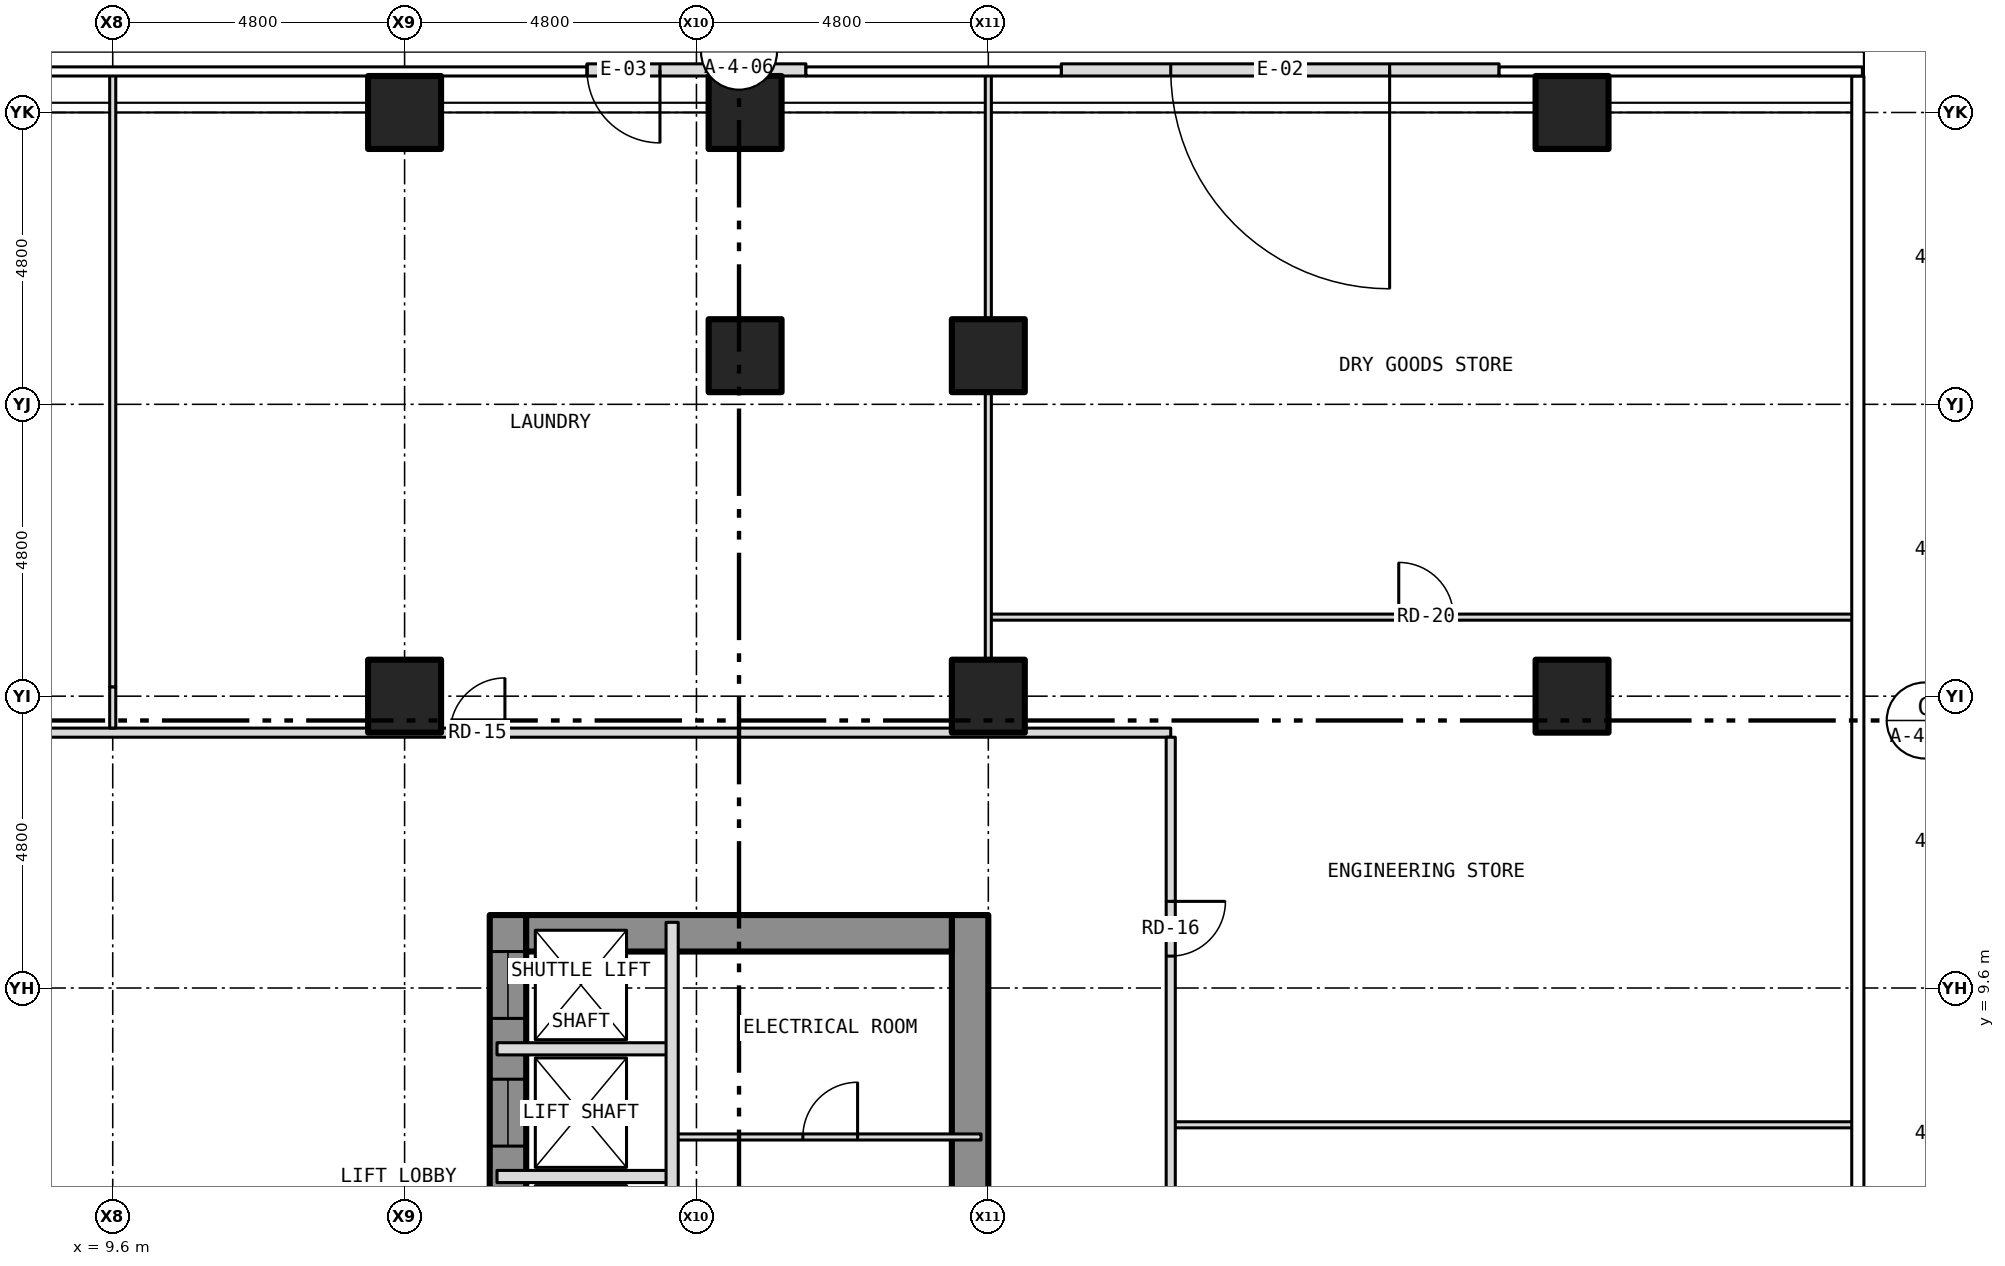
"""IFC4 building model, lengths in metres.
Left out: names, types, materials, properties, quantities, classifications, styles, units other than length and angle.
Written with IfcOpenShell. Run it as: python <this file> out.ifc"""

import sys

from ifc_helpers import new_model, si_unit, direction, frame, frame_2d, origin, origin_2d, place, context, subcontext, project, spatial, rectangle, hollow_rectangle, extrude, element, fill, save


model = new_model("IFC4")
c1 = context("Model", 3, precision=1e-05, world=origin(), true_north=direction((0.0, 1.0)))
c2 = subcontext(c1, "Body", "Model", "MODEL_VIEW")
j1 = project(units=[si_unit("LENGTHUNIT", "METRE"), si_unit("PLANEANGLEUNIT", "RADIAN")], contexts=[c1])
p1 = place(None, origin())
s1 = spatial("IfcSite", under=j1, at=p1, CompositionType="ELEMENT")
p2 = place(p1, origin())
s2 = spatial("IfcBuilding", under=s1, at=p2, CompositionType="ELEMENT")
p3 = place(p2, origin())
s3 = spatial("IfcBuildingStorey", under=s2, at=p3, CompositionType="ELEMENT", Elevation=0.0)
for number, where, z_axis, x_axis in (
    (1, (14.4, 24.0, -0.3), (0.0, 0.0, 1.0), (1.0, 0.0, 0.0)),
    (2, (20.0, 24.0, -0.3), (0.0, 0.0, 1.0), (1.0, 0.0, 0.0)),
    (3, (33.6, 14.4, -0.3), (0.0, 0.0, 1.0), (1.0, 0.0, 0.0)),
    (4, (33.6, 24.0, -0.3), (0.0, 0.0, 1.0), (1.0, 0.0, 0.0)),
    (5, (14.4, 14.4, -0.3), (0.0, 0.0, 1.0), (1.0, 0.0, 0.0)),
    (6, (20.0, 20.0, -0.3), (0.0, 0.0, 1.0), (1.0, 0.0, 0.0)),
    (7, (24.0, 14.4, -0.3), (0.0, 0.0, 1.0), (1.0, 0.0, 0.0)),
    (8, (24.0, 20.0, -0.3), (0.0, 0.0, 1.0), (1.0, 0.0, 0.0)),
):
    element("IfcColumn", number, at=place(p3, frame(where, z_axis=z_axis, x_axis=x_axis)), inside=s3, PredefinedType="COLUMN", context=c2, shape_type="SweptSolid", body=[
        extrude(hollow_rectangle(XDim=1.2, YDim=1.2, WallThickness=0.07, at=origin_2d()), origin(), (0.0, 0.0, 1.0), 7.55),
    ])
p4 = place(p3, frame((16.1, -10.8, 0.0), z_axis=(0.0, 0.0, 1.0), x_axis=(0.0, 1.0, 0.0)))
e9 = element("IfcWall", 9, at=p4, inside=s3, PredefinedType="SHEAR", context=c2, shape_type="SweptSolid", body=[
    extrude(rectangle(XDim=21.6, YDim=0.6, at=frame_2d((10.8, 0.0))), origin(), (0.0, 0.0, 1.0), 7.2),
])
p5 = place(p4, frame((9.4, 0.0, 0.0)))
e10 = element("IfcOpeningElement", 10, at=p5, cuts=e9, PredefinedType="OPENING", context=c2, shape_type="SweptSolid", body=[
    extrude(rectangle(XDim=1.1, YDim=2.1, at=frame_2d((0.55, 1.05))), frame((0.0, 0.312, 0.0), z_axis=(0.0, -1.0, 0.0), x_axis=(1.0, 0.0, 0.0)), (0.0, 0.0, 1.0), 0.624),
])
p6 = place(p4, frame((11.5, 0.0, 0.0)))
e11 = element("IfcOpeningElement", 11, at=p6, cuts=e9, PredefinedType="OPENING", context=c2, shape_type="SweptSolid", body=[
    extrude(rectangle(XDim=1.1, YDim=2.1, at=frame_2d((0.55, 1.05))), frame((0.0, 0.312, 0.0), z_axis=(0.0, -1.0, 0.0), x_axis=(1.0, 0.0, 0.0)), (0.0, 0.0, 1.0), 0.624),
])
p7 = place(p4, frame((13.6, 0.0, 0.0)))
e12 = element("IfcOpeningElement", 12, at=p7, cuts=e9, PredefinedType="OPENING", context=c2, shape_type="SweptSolid", body=[
    extrude(rectangle(XDim=1.1, YDim=2.1, at=frame_2d((0.55, 1.05))), frame((0.0, 0.312, 0.0), z_axis=(0.0, -1.0, 0.0), x_axis=(1.0, 0.0, 0.0)), (0.0, 0.0, 1.0), 0.624),
])
p8 = place(p4, frame((15.7, 0.0, 0.0)))
e13 = element("IfcOpeningElement", 13, at=p8, cuts=e9, PredefinedType="OPENING", context=c2, shape_type="SweptSolid", body=[
    extrude(rectangle(XDim=1.1, YDim=2.1, at=frame_2d((0.55, 1.05))), frame((0.0, 0.312, 0.0), z_axis=(0.0, -1.0, 0.0), x_axis=(1.0, 0.0, 0.0)), (0.0, 0.0, 1.0), 0.624),
])
p9 = place(p4, frame((17.8, 0.0, 0.0)))
e14 = element("IfcOpeningElement", 14, at=p9, cuts=e9, PredefinedType="OPENING", context=c2, shape_type="SweptSolid", body=[
    extrude(rectangle(XDim=1.1, YDim=2.1, at=frame_2d((0.55, 1.05))), frame((0.0, 0.312, 0.0), z_axis=(0.0, -1.0, 0.0), x_axis=(1.0, 0.0, 0.0)), (0.0, 0.0, 1.0), 0.624),
])
p10 = place(p4, frame((19.9, 0.0, 0.0)))
e15 = element("IfcOpeningElement", 15, at=p10, cuts=e9, PredefinedType="OPENING", context=c2, shape_type="SweptSolid", body=[
    extrude(rectangle(XDim=1.1, YDim=2.1, at=frame_2d((0.55, 1.05))), frame((0.0, 0.312, 0.0), z_axis=(0.0, -1.0, 0.0), x_axis=(1.0, 0.0, 0.0)), (0.0, 0.0, 1.0), 0.624),
])
p11 = place(p3, frame((23.7, -10.8, 0.0), z_axis=(0.0, 0.0, 1.0), x_axis=(0.0, 1.0, 0.0)))
e16 = element("IfcWall", 16, at=p11, inside=s3, PredefinedType="SHEAR", context=c2, shape_type="SweptSolid", body=[
    extrude(rectangle(XDim=21.6, YDim=0.6, at=frame_2d((10.8, 0.0))), origin(), (0.0, 0.0, 1.0), 7.2),
])
p12 = place(p3, frame((16.4, 10.5, 0.0), z_axis=(0.0, 0.0, 1.0), x_axis=(1.0, 0.0, 0.0)))
e17 = element("IfcWall", 17, at=p12, inside=s3, PredefinedType="SHEAR", context=c2, shape_type="SweptSolid", body=[
    extrude(rectangle(XDim=7.0, YDim=0.6, at=frame_2d((3.5, 0.0))), origin(), (0.0, 0.0, 1.0), 7.2),
])
p13 = place(p3, frame((32.4, 24.7, -0.2), z_axis=(0.0, 0.0, 1.0), x_axis=(-1.0, 0.0, 0.0)))
e18 = element("IfcWall", 18, at=p13, inside=s3, PredefinedType="SOLIDWALL", context=c2, shape_type="SweptSolid", body=[
    extrude(rectangle(XDim=7.2, YDim=0.2, at=frame_2d((3.6, 0.0))), origin(), (0.0, 0.0, 1.0), 7.7),
])
p14 = place(p13, frame((1.8, 0.0, 0.2)))
e19 = element("IfcOpeningElement", 19, at=p14, cuts=e18, PredefinedType="OPENING", context=c2, shape_type="SweptSolid", body=[
    extrude(rectangle(XDim=3.6, YDim=4.2, at=frame_2d((1.8, 2.1))), frame((0.0, 0.112, 0.0), z_axis=(0.0, -1.0, 0.0), x_axis=(1.0, 0.0, 0.0)), (0.0, 0.0, 1.0), 0.224),
])
p15 = place(p3, frame((21.0, 24.7, -0.2), z_axis=(0.0, 0.0, 1.0), x_axis=(-1.0, 0.0, 0.0)))
e20 = element("IfcWall", 20, at=p15, inside=s3, PredefinedType="SOLIDWALL", context=c2, shape_type="SweptSolid", body=[
    extrude(rectangle(XDim=3.6, YDim=0.2, at=frame_2d((1.8, 0.0))), origin(), (0.0, 0.0, 1.0), 7.7),
])
p16 = place(p15, frame((2.4, 0.0, 0.2)))
e21 = element("IfcOpeningElement", 21, at=p16, cuts=e20, PredefinedType="OPENING", context=c2, shape_type="SweptSolid", body=[
    extrude(rectangle(XDim=1.2, YDim=2.4, at=frame_2d((0.6, 1.2))), frame((0.0, 0.112, 0.0), z_axis=(0.0, -1.0, 0.0), x_axis=(1.0, 0.0, 0.0)), (0.0, 0.0, 1.0), 0.224),
])
p17 = place(p3, frame((15.92, 6.5, 0.0), z_axis=(0.0, 0.0, 1.0), x_axis=(1.0, 0.0, 0.0)))
e22 = element("IfcWall", 22, at=p17, inside=s3, PredefinedType="PARTITIONING", context=c2, shape_type="SweptSolid", body=[
    extrude(rectangle(XDim=2.88, YDim=0.2, at=frame_2d((1.44, 0.0))), origin(), (0.0, 0.0, 1.0), 7.2),
])
p18 = place(p3, frame((18.8, 7.15, 0.0), z_axis=(0.0, 0.0, 1.0), x_axis=(1.0, 0.0, 0.0)))
e23 = element("IfcWall", 23, at=p18, inside=s3, PredefinedType="PARTITIONING", context=c2, shape_type="SweptSolid", body=[
    extrude(rectangle(XDim=5.08, YDim=0.1, at=frame_2d((2.54, 0.0))), origin(), (0.0, 0.0, 1.0), 7.2),
])
p19 = place(p18, frame((2.15, 0.0, 0.0)))
e24 = element("IfcOpeningElement", 24, at=p19, cuts=e23, PredefinedType="OPENING", context=c2, shape_type="SweptSolid", body=[
    extrude(rectangle(XDim=0.9, YDim=2.1, at=frame_2d((0.45, 1.05))), frame((0.0, 0.062, 0.0), z_axis=(0.0, -1.0, 0.0), x_axis=(1.0, 0.0, 0.0)), (0.0, 0.0, 1.0), 0.124),
])
p20 = place(p3, frame((27.0, 7.35, 0.0), z_axis=(0.0, 0.0, 1.0), x_axis=(1.0, 0.0, 0.0)))
e25 = element("IfcWall", 25, at=p20, inside=s3, PredefinedType="PARTITIONING", context=c2, shape_type="SweptSolid", body=[
    extrude(rectangle(XDim=11.28, YDim=0.1, at=frame_2d((5.64, 0.0))), origin(), (0.0, 0.0, 1.0), 7.25),
])
p21 = place(p3, frame((15.92, 8.6, 0.0), z_axis=(0.0, 0.0, 1.0), x_axis=(1.0, 0.0, 0.0)))
e26 = element("IfcWall", 26, at=p21, inside=s3, PredefinedType="PARTITIONING", context=c2, shape_type="SweptSolid", body=[
    extrude(rectangle(XDim=2.88, YDim=0.2, at=frame_2d((1.44, 0.0))), origin(), (0.0, 0.0, 1.0), 7.2),
])
p22 = place(p3, frame((-27.0, 13.8, 0.0), z_axis=(0.0, 0.0, 1.0), x_axis=(1.0, 0.0, 0.0)))
e27 = element("IfcWall", 27, at=p22, inside=s3, PredefinedType="PARTITIONING", context=c2, shape_type="SweptSolid", body=[
    extrude(rectangle(XDim=54.0, YDim=0.15, at=frame_2d((27.0, 0.0))), origin(), (0.0, 0.0, 1.0), 7.25),
])
p23 = place(p22, frame((10.291, 0.0, 0.0)))
e28 = element("IfcOpeningElement", 28, at=p23, cuts=e27, PredefinedType="OPENING", context=c2, shape_type="SweptSolid", body=[
    extrude(rectangle(XDim=0.9, YDim=2.1, at=frame_2d((0.45, 1.05))), frame((0.0, 0.087, 0.0), z_axis=(0.0, -1.0, 0.0), x_axis=(1.0, 0.0, 0.0)), (0.0, 0.0, 1.0), 0.174),
])
p24 = place(p22, frame((20.674, 0.0, 0.0)))
e29 = element("IfcOpeningElement", 29, at=p24, cuts=e27, PredefinedType="OPENING", context=c2, shape_type="SweptSolid", body=[
    extrude(rectangle(XDim=0.9, YDim=2.1, at=frame_2d((0.45, 1.05))), frame((0.0, 0.087, 0.0), z_axis=(0.0, -1.0, 0.0), x_axis=(1.0, 0.0, 0.0)), (0.0, 0.0, 1.0), 0.174),
])
p25 = place(p22, frame((32.55, 0.0, 0.0)))
e30 = element("IfcOpeningElement", 30, at=p25, cuts=e27, PredefinedType="OPENING", context=c2, shape_type="SweptSolid", body=[
    extrude(rectangle(XDim=0.9, YDim=2.1, at=frame_2d((0.45, 1.05))), frame((0.0, 0.087, 0.0), z_axis=(0.0, -1.0, 0.0), x_axis=(1.0, 0.0, 0.0)), (0.0, 0.0, 1.0), 0.174),
])
p26 = place(p22, frame((42.15, 0.0, 0.0)))
e31 = element("IfcOpeningElement", 31, at=p26, cuts=e27, PredefinedType="OPENING", context=c2, shape_type="SweptSolid", body=[
    extrude(rectangle(XDim=0.9, YDim=2.1, at=frame_2d((0.45, 1.05))), frame((0.0, 0.087, 0.0), z_axis=(0.0, -1.0, 0.0), x_axis=(1.0, 0.0, 0.0)), (0.0, 0.0, 1.0), 0.174),
])
p27 = place(p22, frame((3.75, 0.0, 0.0)))
e32 = element("IfcOpeningElement", 32, at=p27, cuts=e27, PredefinedType="OPENING", context=c2, shape_type="SweptSolid", body=[
    extrude(rectangle(XDim=0.9, YDim=2.1, at=frame_2d((0.45, 1.05))), frame((0.0, 0.087, 0.0), z_axis=(0.0, -1.0, 0.0), x_axis=(1.0, 0.0, 0.0)), (0.0, 0.0, 1.0), 0.174),
])
p28 = place(p3, frame((24.0, 15.7, 0.0), z_axis=(0.0, 0.0, 1.0), x_axis=(1.0, 0.0, 0.0)))
e33 = element("IfcWall", 33, at=p28, inside=s3, PredefinedType="PARTITIONING", context=c2, shape_type="SweptSolid", body=[
    extrude(rectangle(XDim=14.28, YDim=0.1, at=frame_2d((7.14, 0.0))), origin(), (0.0, 0.0, 1.0), 7.25),
])
p29 = place(p28, frame((6.75, 0.0, 0.0)))
e34 = element("IfcOpeningElement", 34, at=p29, cuts=e33, PredefinedType="OPENING", context=c2, shape_type="SweptSolid", body=[
    extrude(rectangle(XDim=0.9, YDim=2.1, at=frame_2d((0.45, 1.05))), frame((0.0, 0.062, 0.0), z_axis=(0.0, -1.0, 0.0), x_axis=(1.0, 0.0, 0.0)), (0.0, 0.0, 1.0), 0.124),
])
p30 = place(p3, frame((9.6, 13.875, 0.0), z_axis=(0.0, 0.0, 1.0), x_axis=(0.0, 1.0, 0.0)))
e35 = element("IfcWall", 35, at=p30, inside=s3, PredefinedType="PARTITIONING", context=c2, shape_type="SweptSolid", body=[
    extrude(rectangle(XDim=0.679, YDim=0.1, at=frame_2d((0.339, 0.0))), origin(), (0.0, 0.0, 1.0), 7.25),
])
p31 = place(p3, frame((9.6, 14.554, 0.0), z_axis=(0.0, 0.0, 1.0), x_axis=(0.0, 1.0, 0.0)))
e36 = element("IfcWall", 36, at=p31, inside=s3, PredefinedType="PARTITIONING", context=c2, shape_type="SweptSolid", body=[
    extrude(rectangle(XDim=10.076, YDim=0.1, at=frame_2d((5.038, 0.0))), origin(), (0.0, 0.0, 1.0), 6.633),
])
p32 = place(p3, frame((18.8, -1.8, 0.0), z_axis=(0.0, 0.0, 1.0), x_axis=(0.0, 1.0, 0.0)))
e37 = element("IfcWall", 37, at=p32, inside=s3, PredefinedType="PARTITIONING", context=c2, shape_type="SweptSolid", body=[
    extrude(rectangle(XDim=12.48, YDim=0.2, at=frame_2d((6.24, 0.0))), origin(), (0.0, 0.0, 1.0), 7.2),
])
p33 = place(p3, frame((24.0, 13.875, 0.0), z_axis=(0.0, 0.0, 1.0), x_axis=(0.0, 1.0, 0.0)))
e38 = element("IfcWall", 38, at=p33, inside=s3, PredefinedType="PARTITIONING", context=c2, shape_type="SweptSolid", body=[
    extrude(rectangle(XDim=1.125, YDim=0.1, at=frame_2d((0.562, 0.0))), origin(), (0.0, 0.0, 1.0), 7.25),
])
p34 = place(p3, frame((24.0, 15.0, 0.0), z_axis=(0.0, 0.0, 1.0), x_axis=(0.0, 1.0, 0.0)))
e39 = element("IfcWall", 39, at=p34, inside=s3, PredefinedType="PARTITIONING", context=c2, shape_type="SweptSolid", body=[
    extrude(rectangle(XDim=4.4, YDim=0.1, at=frame_2d((2.2, 0.0))), origin(), (0.0, 0.0, 1.0), 6.323),
])
p35 = place(p3, frame((24.0, 19.4, 0.0), z_axis=(0.0, 0.0, 1.0), x_axis=(0.0, 1.0, 0.0)))
e40 = element("IfcWall", 40, at=p35, inside=s3, PredefinedType="PARTITIONING", context=c2, shape_type="SweptSolid", body=[
    extrude(rectangle(XDim=1.2, YDim=0.1, at=frame_2d((0.6, 0.0))), origin(), (0.0, 0.0, 1.0), 7.25),
])
p36 = place(p3, frame((24.0, 20.6, 0.0), z_axis=(0.0, 0.0, 1.0), x_axis=(0.0, 1.0, 0.0)))
e41 = element("IfcWall", 41, at=p36, inside=s3, PredefinedType="PARTITIONING", context=c2, shape_type="SweptSolid", body=[
    extrude(rectangle(XDim=4.03, YDim=0.1, at=frame_2d((2.015, 0.0))), origin(), (0.0, 0.0, 1.0), 6.323),
])
p37 = place(p3, frame((27.0, -9.225, 0.0), z_axis=(0.0, 0.0, 1.0), x_axis=(0.0, 1.0, 0.0)))
e42 = element("IfcWall", 42, at=p37, inside=s3, PredefinedType="PARTITIONING", context=c2, shape_type="SweptSolid", body=[
    extrude(rectangle(XDim=22.95, YDim=0.15, at=frame_2d((11.475, 0.0))), origin(), (0.0, 0.0, 1.0), 7.25),
])
p38 = place(p37, frame((7.8, 0.0, 0.0)))
e43 = element("IfcOpeningElement", 43, at=p38, cuts=e42, PredefinedType="OPENING", context=c2, shape_type="SweptSolid", body=[
    extrude(rectangle(XDim=0.9, YDim=2.1, at=frame_2d((0.45, 1.05))), frame((0.0, 0.087, 0.0), z_axis=(0.0, -1.0, 0.0), x_axis=(1.0, 0.0, 0.0)), (0.0, 0.0, 1.0), 0.174),
])
p39 = place(p37, frame((19.35, 0.0, 0.0)))
e44 = element("IfcOpeningElement", 44, at=p39, cuts=e42, PredefinedType="OPENING", context=c2, shape_type="SweptSolid", body=[
    extrude(rectangle(XDim=0.9, YDim=2.1, at=frame_2d((0.45, 1.05))), frame((0.0, 0.087, 0.0), z_axis=(0.0, -1.0, 0.0), x_axis=(1.0, 0.0, 0.0)), (0.0, 0.0, 1.0), 0.174),
])
p40 = place(p14, origin())
e45 = element("IfcDoor", 45, at=p40, inside=s3, OperationType="ROLLINGUP", PredefinedType="GATE", context=c2, shape_type="SweptSolid", body=[
    extrude(rectangle(XDim=3.6, YDim=4.2, at=frame_2d((1.8, 2.1))), frame((0.0, 0.025, 0.0), z_axis=(0.0, -1.0, 0.0), x_axis=(1.0, 0.0, 0.0)), (0.0, 0.0, 1.0), 0.05),
])
fill(e19, e45)
p41 = place(p16, origin())
e46 = element("IfcDoor", 46, at=p41, inside=s3, OperationType="SINGLE_SWING_LEFT", PredefinedType="DOOR", context=c2, shape_type="SweptSolid", body=[
    extrude(rectangle(XDim=1.2, YDim=2.4, at=frame_2d((0.6, 1.2))), frame((0.0, 0.025, 0.0), z_axis=(0.0, -1.0, 0.0), x_axis=(1.0, 0.0, 0.0)), (0.0, 0.0, 1.0), 0.05),
])
fill(e21, e46)
p42 = place(p9, origin())
e47 = element("IfcDoor", 47, at=p42, inside=s3, OperationType="SLIDING_TO_LEFT", PredefinedType="DOOR", context=c2, shape_type="SweptSolid", body=[
    extrude(rectangle(XDim=1.1, YDim=2.1, at=frame_2d((0.55, 1.05))), frame((0.0, 0.025, 0.0), z_axis=(0.0, -1.0, 0.0), x_axis=(1.0, 0.0, 0.0)), (0.0, 0.0, 1.0), 0.05),
])
fill(e14, e47)
p43 = place(p10, origin())
e48 = element("IfcDoor", 48, at=p43, inside=s3, OperationType="SLIDING_TO_LEFT", PredefinedType="DOOR", context=c2, shape_type="SweptSolid", body=[
    extrude(rectangle(XDim=1.1, YDim=2.1, at=frame_2d((0.55, 1.05))), frame((0.0, 0.025, 0.0), z_axis=(0.0, -1.0, 0.0), x_axis=(1.0, 0.0, 0.0)), (0.0, 0.0, 1.0), 0.05),
])
fill(e15, e48)
p44 = place(p19, origin())
e49 = element("IfcDoor", 49, at=p44, inside=s3, OperationType="SINGLE_SWING_RIGHT", PredefinedType="DOOR", context=c2, shape_type="SweptSolid", body=[
    extrude(rectangle(XDim=0.9, YDim=2.1, at=frame_2d((0.45, 1.05))), frame((0.0, 0.025, 0.0), z_axis=(0.0, -1.0, 0.0), x_axis=(1.0, 0.0, 0.0)), (0.0, 0.0, 1.0), 0.05),
])
fill(e24, e49)
p45 = place(p26, origin())
e50 = element("IfcDoor", 50, at=p45, inside=s3, OperationType="SINGLE_SWING_RIGHT", PredefinedType="DOOR", context=c2, shape_type="SweptSolid", body=[
    extrude(rectangle(XDim=0.9, YDim=2.1, at=frame_2d((0.45, 1.05))), frame((0.0, 0.025, 0.0), z_axis=(0.0, -1.0, 0.0), x_axis=(1.0, 0.0, 0.0)), (0.0, 0.0, 1.0), 0.05),
])
fill(e31, e50)
p46 = place(p39, origin())
e51 = element("IfcDoor", 51, at=p46, inside=s3, OperationType="SINGLE_SWING_RIGHT", PredefinedType="DOOR", context=c2, shape_type="SweptSolid", body=[
    extrude(rectangle(XDim=0.9, YDim=2.1, at=frame_2d((0.45, 1.05))), frame((0.0, 0.025, 0.0), z_axis=(0.0, -1.0, 0.0), x_axis=(1.0, 0.0, 0.0)), (0.0, 0.0, 1.0), 0.05),
])
fill(e44, e51)
p47 = place(p29, origin())
e52 = element("IfcDoor", 52, at=p47, inside=s3, OperationType="SINGLE_SWING_LEFT", PredefinedType="DOOR", context=c2, shape_type="SweptSolid", body=[
    extrude(rectangle(XDim=0.9, YDim=2.1, at=frame_2d((0.45, 1.05))), frame((0.0, 0.025, 0.0), z_axis=(0.0, -1.0, 0.0), x_axis=(1.0, 0.0, 0.0)), (0.0, 0.0, 1.0), 0.05),
])
fill(e34, e52)
save(model, sys.argv[1])
